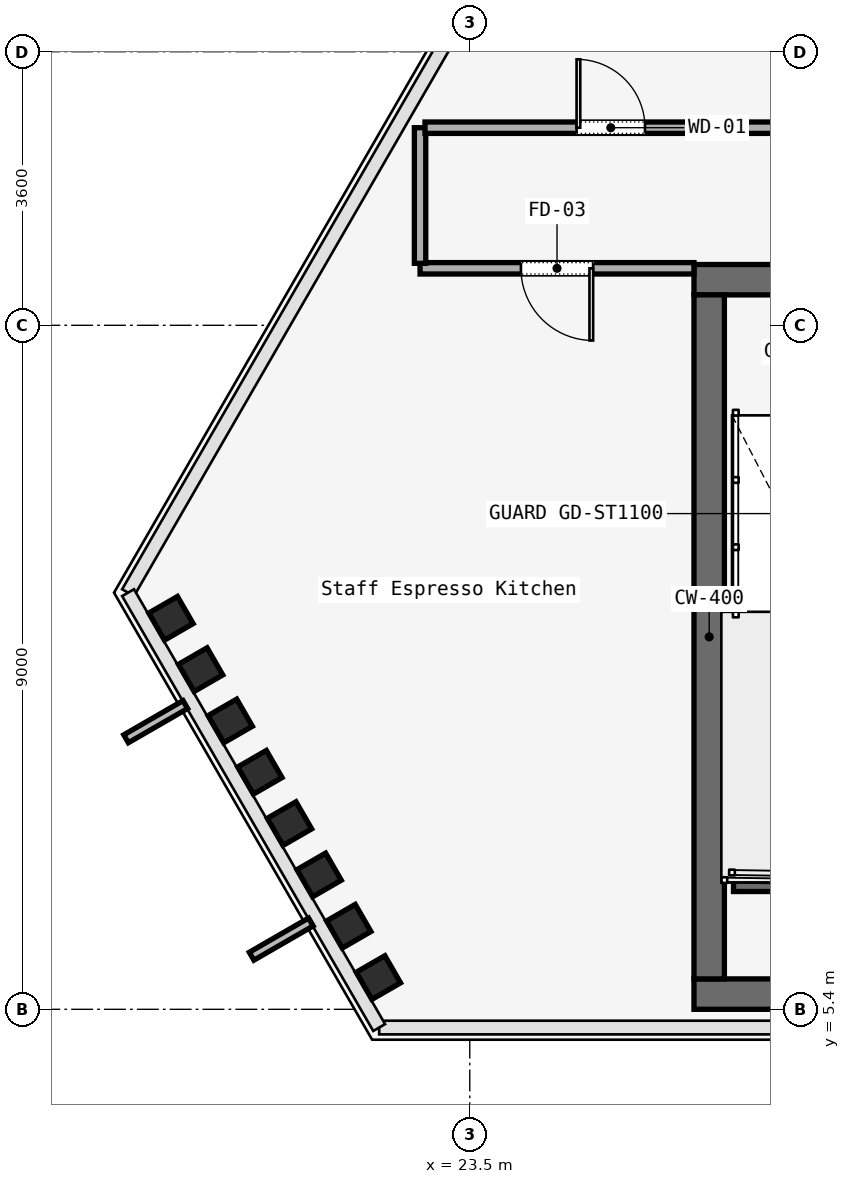
"""IFC4 building model, lengths in metres.
Left out: names, types, materials, properties, quantities, classifications, styles, units other than length and angle.
Written with IfcOpenShell. Run it as: python <this file> out.ifc"""

import sys

from ifc_helpers import new_model, si_unit, direction, frame, frame_2d, origin, origin_2d, place, context, subcontext, project, spatial, rectangle, i_section, extrude, element, fill, save


model = new_model("IFC4")
c1 = context("Model", 3, precision=1e-05, world=origin(), true_north=direction((0.0, 1.0)))
c2 = subcontext(c1, "Body", "Model", "MODEL_VIEW")
j1 = project(units=[si_unit("LENGTHUNIT", "METRE"), si_unit("PLANEANGLEUNIT", "RADIAN")], contexts=[c1])
p1 = place(None, origin())
s1 = spatial("IfcSite", under=j1, at=p1, CompositionType="ELEMENT")
p2 = place(p1, origin())
s2 = spatial("IfcBuilding", under=s1, at=p2, CompositionType="ELEMENT")
p3 = place(p2, frame((0.0, 0.0, 244.6)))
s3 = spatial("IfcBuildingStorey", under=s2, at=p3, CompositionType="ELEMENT", Elevation=244.6)
p4 = place(p3, frame((26.45, 15.0, 0.0), z_axis=(0.0, 0.0, 1.0), x_axis=(1.0, 0.0, 0.0)))
e1 = element("IfcWall", 1, at=p4, inside=s3, PredefinedType="SOLIDWALL", context=c2, shape_type="SweptSolid", body=[
    extrude(rectangle(XDim=31.1, YDim=0.4, at=frame_2d((15.55, 0.0))), origin(), (0.0, 0.0, 1.0), 3.58),
])
p5 = place(p4, frame((1.65, 0.0, 0.0)))
e2 = element("IfcOpeningElement", 2, at=p5, cuts=e1, PredefinedType="OPENING", context=c2, shape_type="SweptSolid", body=[
    extrude(rectangle(XDim=1.1, YDim=2.2, at=frame_2d((0.55, 1.1))), frame((0.0, 0.2, 0.0), z_axis=(0.0, -1.0, 0.0), x_axis=(1.0, 0.0, 0.0)), (0.0, 0.0, 1.0), 0.4),
])
p6 = place(p4, frame((13.65, 0.0, 0.0)))
e3 = element("IfcOpeningElement", 3, at=p6, cuts=e1, PredefinedType="OPENING", context=c2, shape_type="SweptSolid", body=[
    extrude(rectangle(XDim=1.1, YDim=2.2, at=frame_2d((0.55, 1.1))), frame((0.0, 0.2, 0.0), z_axis=(0.0, -1.0, 0.0), x_axis=(1.0, 0.0, 0.0)), (0.0, 0.0, 1.0), 0.4),
])
p7 = place(p4, frame((25.55, 0.0, 0.0)))
e4 = element("IfcOpeningElement", 4, at=p7, cuts=e1, PredefinedType="OPENING", context=c2, shape_type="SweptSolid", body=[
    extrude(rectangle(XDim=1.1, YDim=2.2, at=frame_2d((0.55, 1.1))), frame((0.0, 0.2, 0.0), z_axis=(0.0, -1.0, 0.0), x_axis=(1.0, 0.0, 0.0)), (0.0, 0.0, 1.0), 0.4),
])
p8 = place(p4, frame((19.35, 0.0, 0.0)))
e5 = element("IfcOpeningElement", 5, at=p8, cuts=e1, PredefinedType="OPENING", context=c2, shape_type="SweptSolid", body=[
    extrude(rectangle(XDim=1.1, YDim=2.2, at=frame_2d((0.55, 1.1))), frame((0.0, 0.2, 0.0), z_axis=(0.0, -1.0, 0.0), x_axis=(1.0, 0.0, 0.0)), (0.0, 0.0, 1.0), 0.4),
])
p9 = place(p4, frame((21.4, 0.0, 0.0)))
e6 = element("IfcOpeningElement", 6, at=p9, cuts=e1, PredefinedType="OPENING", context=c2, shape_type="SweptSolid", body=[
    extrude(rectangle(XDim=0.9, YDim=2.1, at=frame_2d((0.45, 1.05))), frame((0.0, 0.2, 0.0), z_axis=(0.0, -1.0, 0.0), x_axis=(1.0, 0.0, 0.0)), (0.0, 0.0, 1.0), 0.4),
])
p10 = place(p4, frame((5.54, 0.0, 0.0)))
e7 = element("IfcOpeningElement", 7, at=p10, cuts=e1, PredefinedType="OPENING", context=c2, shape_type="SweptSolid", body=[
    extrude(rectangle(XDim=0.95, YDim=2.2, at=frame_2d((0.475, 1.1))), frame((0.0, 0.2, 0.0), z_axis=(0.0, -1.0, 0.0), x_axis=(1.0, 0.0, 0.0)), (0.0, 0.0, 1.0), 0.4),
])
p11 = place(p4, frame((9.49, 0.0, 0.0)))
e8 = element("IfcOpeningElement", 8, at=p11, cuts=e1, PredefinedType="OPENING", context=c2, shape_type="SweptSolid", body=[
    extrude(rectangle(XDim=0.95, YDim=2.2, at=frame_2d((0.475, 1.1))), frame((0.0, 0.2, 0.0), z_axis=(0.0, -1.0, 0.0), x_axis=(1.0, 0.0, 0.0)), (0.0, 0.0, 1.0), 0.4),
])
p12 = place(p4, frame((23.35, 0.0, 0.0)))
e9 = element("IfcOpeningElement", 9, at=p12, cuts=e1, PredefinedType="OPENING", context=c2, shape_type="SweptSolid", body=[
    extrude(rectangle(XDim=1.3, YDim=2.3, at=frame_2d((0.65, 1.15))), frame((0.0, 0.2, 0.0), z_axis=(0.0, -1.0, 0.0), x_axis=(1.0, 0.0, 0.0)), (0.0, 0.0, 1.0), 0.4),
])
p13 = place(p3, frame((26.45, 5.6, 0.0), z_axis=(0.0, 0.0, 1.0), x_axis=(1.0, 0.0, 0.0)))
e10 = element("IfcWall", 10, at=p13, inside=s3, PredefinedType="SOLIDWALL", context=c2, shape_type="SweptSolid", body=[
    extrude(rectangle(XDim=31.1, YDim=0.4, at=frame_2d((15.55, 0.0))), origin(), (0.0, 0.0, 1.0), 3.58),
])
p14 = place(p3, frame((26.65, 5.8, 0.0), z_axis=(0.0, 0.0, 1.0), x_axis=(0.0, 1.0, 0.0)))
e11 = element("IfcWall", 11, at=p14, inside=s3, PredefinedType="SOLIDWALL", context=c2, shape_type="SweptSolid", body=[
    extrude(rectangle(XDim=9.0, YDim=0.4, at=frame_2d((4.5, 0.0))), origin(), (0.0, 0.0, 1.0), 3.58),
])
for number, where, z_axis, x_axis in (
    (12, (19.569, 10.544, 0.0), (0.0, 0.0, 1.0), (-0.5, 0.866, 0.0)),
    (13, (19.959, 9.869, 0.0), (0.0, 0.0, 1.0), (-0.5, 0.866, 0.0)),
    (14, (20.348, 9.194, 0.0), (0.0, 0.0, 1.0), (-0.5, 0.866, 0.0)),
    (15, (20.738, 8.519, 0.0), (0.0, 0.0, 1.0), (-0.5, 0.866, 0.0)),
    (16, (21.128, 7.844, 0.0), (0.0, 0.0, 1.0), (-0.5, 0.866, 0.0)),
    (17, (21.518, 7.168, 0.0), (0.0, 0.0, 1.0), (-0.5, 0.866, 0.0)),
    (18, (21.908, 6.493, 0.0), (0.0, 0.0, 1.0), (-0.5, 0.866, 0.0)),
    (19, (22.298, 5.818, 0.0), (0.0, 0.0, 1.0), (-0.5, 0.866, 0.0)),
):
    element("IfcColumn", number, at=place(p3, frame(where, z_axis=z_axis, x_axis=x_axis)), inside=s3, PredefinedType="COLUMN", context=c2, shape_type="SweptSolid", body=[
        extrude(i_section(OverallWidth=0.412, OverallDepth=0.435, WebThickness=0.036, FlangeThickness=0.044, FilletRadius=0.015, at=origin_2d()), origin(), (0.0, 0.0, 1.0), 3.58),
    ])
p15 = place(p3, frame((26.97, 7.05, 0.0), z_axis=(0.0, 0.0, 1.0), x_axis=(1.0, 0.0, 0.0)))
e20 = element("IfcWall", 20, at=p15, inside=s3, PredefinedType="SOLIDWALL", context=c2, shape_type="SweptSolid", body=[
    extrude(rectangle(XDim=3.115, YDim=0.2, at=frame_2d((1.558, 0.0))), origin(), (0.0, 0.0, 1.0), 3.8),
])
p16 = place(p3, frame((26.45, 15.15, 0.0), z_axis=(0.0, 0.0, 1.0), x_axis=(-1.0, 0.0, 0.0)))
e21 = element("IfcWall", 21, at=p16, inside=s3, PredefinedType="PARTITIONING", context=c2, shape_type="SweptSolid", body=[
    extrude(rectangle(XDim=3.604, YDim=0.15, at=frame_2d((1.802, 0.0))), origin(), (0.0, 0.0, 1.0), 3.01),
])
p17 = place(p16, frame((1.327, 0.0, 0.0)))
e22 = element("IfcOpeningElement", 22, at=p17, cuts=e21, PredefinedType="OPENING", context=c2, shape_type="SweptSolid", body=[
    extrude(rectangle(XDim=0.95, YDim=2.2, at=frame_2d((0.475, 1.1))), frame((0.0, 0.075, 0.0), z_axis=(0.0, -1.0, 0.0), x_axis=(1.0, 0.0, 0.0)), (0.0, 0.0, 1.0), 0.15),
])
p18 = place(p3, frame((22.846, 15.215, 0.0), z_axis=(0.0, 0.0, 1.0), x_axis=(0.0, 1.0, 0.0)))
e23 = element("IfcWall", 23, at=p18, inside=s3, PredefinedType="PARTITIONING", context=c2, shape_type="SweptSolid", body=[
    extrude(rectangle(XDim=1.785, YDim=0.15, at=frame_2d((0.893, 0.0))), origin(), (0.0, 0.0, 1.0), 3.01),
])
p19 = place(p3, frame((22.911, 17.0, 0.0), z_axis=(0.0, 0.0, 1.0), x_axis=(1.0, 0.0, 0.0)))
e24 = element("IfcWall", 24, at=p19, inside=s3, PredefinedType="PARTITIONING", context=c2, shape_type="SweptSolid", body=[
    extrude(rectangle(XDim=4.889, YDim=0.15, at=frame_2d((2.445, 0.0))), origin(), (0.0, 0.0, 1.0), 3.01),
])
p20 = place(p19, frame((1.994, 0.0, 0.0)))
e25 = element("IfcOpeningElement", 25, at=p20, cuts=e24, PredefinedType="OPENING", context=c2, shape_type="SweptSolid", body=[
    extrude(rectangle(XDim=0.9, YDim=2.15, at=frame_2d((0.45, 1.075))), frame((0.0, 0.075, 0.0), z_axis=(0.0, -1.0, 0.0), x_axis=(1.0, 0.0, 0.0)), (0.0, 0.0, 1.0), 0.15),
])
p21 = place(p17, origin())
e26 = element("IfcDoor", 26, at=p21, inside=s3, OperationType="SINGLE_SWING_RIGHT", PredefinedType="DOOR", context=c2, shape_type="SweptSolid", body=[
    extrude(rectangle(XDim=0.95, YDim=2.2, at=frame_2d((0.475, 1.1))), frame((0.0, 0.025, 0.0), z_axis=(0.0, -1.0, 0.0), x_axis=(1.0, 0.0, 0.0)), (0.0, 0.0, 1.0), 0.05),
])
fill(e22, e26)
p22 = place(p20, origin())
e27 = element("IfcDoor", 27, at=p22, inside=s3, OperationType="SINGLE_SWING_LEFT", PredefinedType="DOOR", context=c2, shape_type="SweptSolid", body=[
    extrude(rectangle(XDim=0.9, YDim=2.15, at=frame_2d((0.45, 1.075))), frame((0.0, 0.025, 0.0), z_axis=(0.0, -1.0, 0.0), x_axis=(1.0, 0.0, 0.0)), (0.0, 0.0, 1.0), 0.05),
])
fill(e25, e27)
save(model, sys.argv[1])
